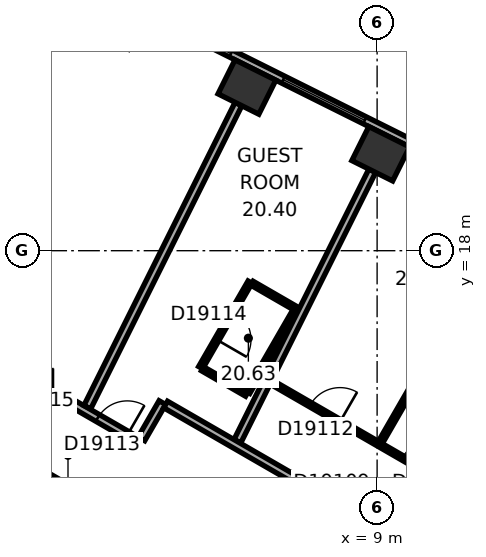
"""IFC4 building model, lengths in metres.
Left out: names, types, materials, properties, quantities, classifications, styles, units other than length and angle.
Written with IfcOpenShell. Run it as: python <this file> out.ifc"""

import sys

from ifc_helpers import new_model, si_unit, direction, frame, frame_2d, origin, origin_2d, place, context, subcontext, project, spatial, rectangle, extrude, element, fill, save


model = new_model("IFC4")
c1 = context("Model", 3, precision=1e-05, world=origin(), true_north=direction((0.0, 1.0)))
c2 = subcontext(c1, "Body", "Model", "MODEL_VIEW")
j1 = project(units=[si_unit("LENGTHUNIT", "METRE"), si_unit("PLANEANGLEUNIT", "RADIAN")], contexts=[c1])
p1 = place(None, origin())
s1 = spatial("IfcSite", under=j1, at=p1, CompositionType="ELEMENT")
p2 = place(p1, origin())
s2 = spatial("IfcBuilding", under=s1, at=p2, CompositionType="ELEMENT")
p3 = place(p2, frame((0.0, 0.0, 90.2)))
s3 = spatial("IfcBuildingStorey", under=s2, at=p3, CompositionType="ELEMENT", Elevation=90.2)
for number, where, z_axis, x_axis in (
    (1, (9.095, 20.551, 0.0), (0.0, 0.0, 1.0), (-0.895, 0.446, 0.0)),
    (2, (5.574, 22.306, 0.0), (0.0, 0.0, 1.0), (-0.895, 0.446, 0.0)),
):
    element("IfcColumn", number, at=place(p3, frame(where, z_axis=z_axis, x_axis=x_axis)), inside=s3, PredefinedType="COLUMN", context=c2, shape_type="SweptSolid", body=[
        extrude(rectangle(XDim=1.2, YDim=1.0, at=origin_2d()), origin(), (0.0, 0.0, 1.0), 3.3),
    ])
p4 = place(p3, frame((10.4, 5.658, 0.0), z_axis=(0.0, 0.0, 1.0), x_axis=(-0.866021384402, 0.500006961711, 0.0)))
e3 = element("IfcWall", 3, at=p4, inside=s3, PredefinedType="SHEAR", context=c2, shape_type="SweptSolid", body=[
    extrude(rectangle(XDim=12.355, YDim=1.2, at=frame_2d((6.178, 0.0))), origin(), (0.0, 0.0, 1.0), 3.3),
])
p5 = place(p4, frame((2.728, 0.0, 0.0)))
e4 = element("IfcOpeningElement", 4, at=p5, cuts=e3, PredefinedType="OPENING", context=c2, shape_type="SweptSolid", body=[
    extrude(rectangle(XDim=1.1, YDim=2.1, at=frame_2d((0.55, 1.05))), frame((0.0, 0.61, 0.0), z_axis=(0.0, -1.0, 0.0), x_axis=(1.0, 0.0, 0.0)), (0.0, 0.0, 1.0), 1.22),
])
p6 = place(p4, frame((5.328, 0.0, 0.0)))
e5 = element("IfcOpeningElement", 5, at=p6, cuts=e3, PredefinedType="OPENING", context=c2, shape_type="SweptSolid", body=[
    extrude(rectangle(XDim=1.1, YDim=2.1, at=frame_2d((0.55, 1.05))), frame((0.0, 0.61, 0.0), z_axis=(0.0, -1.0, 0.0), x_axis=(1.0, 0.0, 0.0)), (0.0, 0.0, 1.0), 1.22),
])
p7 = place(p4, frame((7.928, 0.0, 0.0)))
e6 = element("IfcOpeningElement", 6, at=p7, cuts=e3, PredefinedType="OPENING", context=c2, shape_type="SweptSolid", body=[
    extrude(rectangle(XDim=1.1, YDim=2.1, at=frame_2d((0.55, 1.05))), frame((0.0, 0.61, 0.0), z_axis=(0.0, -1.0, 0.0), x_axis=(1.0, 0.0, 0.0)), (0.0, 0.0, 1.0), 1.22),
])
p8 = place(p3, frame((0.3, 11.836, 0.0), z_axis=(0.0, 0.0, 1.0), x_axis=(-0.866021384402, -0.500006961711, 0.0)))
e7 = element("IfcWall", 7, at=p8, inside=s3, PredefinedType="SHEAR", context=c2, shape_type="SweptSolid", body=[
    extrude(rectangle(XDim=12.355, YDim=1.2, at=frame_2d((6.178, 0.0))), origin(), (0.0, 0.0, 1.0), 3.3),
])
p9 = place(p8, frame((6.378, 0.0, 0.0)))
e8 = element("IfcOpeningElement", 8, at=p9, cuts=e7, PredefinedType="OPENING", context=c2, shape_type="SweptSolid", body=[
    extrude(rectangle(XDim=1.5, YDim=2.1, at=frame_2d((0.75, 1.05))), frame((0.0, 0.61, 0.0), z_axis=(0.0, -1.0, 0.0), x_axis=(1.0, 0.0, 0.0)), (0.0, 0.0, 1.0), 1.22),
])
p10 = place(p8, frame((1.828, 0.0, 0.0)))
e9 = element("IfcOpeningElement", 9, at=p10, cuts=e7, PredefinedType="OPENING", context=c2, shape_type="SweptSolid", body=[
    extrude(rectangle(XDim=1.1, YDim=2.1, at=frame_2d((0.55, 1.05))), frame((0.0, 0.61, 0.0), z_axis=(0.0, -1.0, 0.0), x_axis=(1.0, 0.0, 0.0)), (0.0, 0.0, 1.0), 1.22),
])
p11 = place(p3, frame((20.63, 15.47, 0.0), z_axis=(0.0, 0.0, 1.0), x_axis=(-0.894934518609, 0.446197498203, 0.0)))
e10 = element("IfcWall", 10, at=p11, inside=s3, PredefinedType="STANDARD", context=c2, shape_type="SweptSolid", body=[
    extrude(rectangle(XDim=21.246, YDim=0.2, at=frame_2d((10.623, 0.0))), origin(), (0.0, 0.0, 1.0), 3.3),
])
p12 = place(p11, frame((1.553, 0.0, 0.8)))
e11 = element("IfcOpeningElement", 11, at=p12, cuts=e10, PredefinedType="OPENING", context=c2, shape_type="SweptSolid", body=[
    extrude(rectangle(XDim=2.4, YDim=1.7, at=frame_2d((1.2, 0.85))), frame((0.0, 0.11, 0.0), z_axis=(0.0, -1.0, 0.0), x_axis=(1.0, 0.0, 0.0)), (0.0, 0.0, 1.0), 0.22),
])
p13 = place(p11, frame((5.488, 0.0, 0.8)))
e12 = element("IfcOpeningElement", 12, at=p13, cuts=e10, PredefinedType="OPENING", context=c2, shape_type="SweptSolid", body=[
    extrude(rectangle(XDim=2.4, YDim=1.7, at=frame_2d((1.2, 0.85))), frame((0.0, 0.11, 0.0), z_axis=(0.0, -1.0, 0.0), x_axis=(1.0, 0.0, 0.0)), (0.0, 0.0, 1.0), 0.22),
])
p14 = place(p11, frame((9.422, 0.0, 0.8)))
e13 = element("IfcOpeningElement", 13, at=p14, cuts=e10, PredefinedType="OPENING", context=c2, shape_type="SweptSolid", body=[
    extrude(rectangle(XDim=2.4, YDim=1.7, at=frame_2d((1.2, 0.85))), frame((0.0, 0.11, 0.0), z_axis=(0.0, -1.0, 0.0), x_axis=(1.0, 0.0, 0.0)), (0.0, 0.0, 1.0), 0.22),
])
p15 = place(p11, frame((13.357, 0.0, 0.8)))
e14 = element("IfcOpeningElement", 14, at=p15, cuts=e10, PredefinedType="OPENING", context=c2, shape_type="SweptSolid", body=[
    extrude(rectangle(XDim=2.4, YDim=1.7, at=frame_2d((1.2, 0.85))), frame((0.0, 0.11, 0.0), z_axis=(0.0, -1.0, 0.0), x_axis=(1.0, 0.0, 0.0)), (0.0, 0.0, 1.0), 0.22),
])
p16 = place(p11, frame((17.292, 0.0, 0.8)))
e15 = element("IfcOpeningElement", 15, at=p16, cuts=e10, PredefinedType="OPENING", context=c2, shape_type="SweptSolid", body=[
    extrude(rectangle(XDim=2.4, YDim=1.7, at=frame_2d((1.2, 0.85))), frame((0.0, 0.11, 0.0), z_axis=(0.0, -1.0, 0.0), x_axis=(1.0, 0.0, 0.0)), (0.0, 0.0, 1.0), 0.22),
])
p17 = place(p3, frame((0.95, 14.001, 0.0), z_axis=(0.0, 0.0, 1.0), x_axis=(-1.0, 0.0, 0.0)))
e16 = element("IfcWall", 16, at=p17, inside=s3, PredefinedType="PARTITIONING", context=c2, shape_type="SweptSolid", body=[
    extrude(rectangle(XDim=1.86, YDim=0.2, at=frame_2d((0.93, 0.0))), origin(), (0.0, 0.0, 1.0), 3.05),
])
p18 = place(p17, frame((0.48, 0.0, 0.0)))
e17 = element("IfcOpeningElement", 17, at=p18, cuts=e16, PredefinedType="OPENING", context=c2, shape_type="SweptSolid", body=[
    extrude(rectangle(XDim=0.9, YDim=2.1, at=frame_2d((0.45, 1.05))), frame((0.0, 0.11, 0.0), z_axis=(0.0, -1.0, 0.0), x_axis=(1.0, 0.0, 0.0)), (0.0, 0.0, 1.0), 0.22),
])
p19 = place(p3, frame((2.748, 12.962, 0.0), z_axis=(0.0, 0.0, 1.0), x_axis=(-0.866013897511, 0.50001992892, 0.0)))
e18 = element("IfcWall", 18, at=p19, inside=s3, PredefinedType="PARTITIONING", context=c2, shape_type="SweptSolid", body=[
    extrude(rectangle(XDim=2.037, YDim=0.2, at=frame_2d((1.018, 0.0))), origin(), (0.0, 0.0, 1.0), 3.05),
])
p20 = place(p19, frame((0.372, 0.0, 0.0)))
e19 = element("IfcOpeningElement", 19, at=p20, cuts=e18, PredefinedType="OPENING", context=c2, shape_type="SweptSolid", body=[
    extrude(rectangle(XDim=0.9, YDim=2.1, at=frame_2d((0.45, 1.05))), frame((0.0, 0.11, 0.0), z_axis=(0.0, -1.0, 0.0), x_axis=(1.0, 0.0, 0.0)), (0.0, 0.0, 1.0), 0.22),
])
p21 = place(p3, frame((3.349, 14.002, 0.0), z_axis=(0.0, 0.0, 1.0), x_axis=(-0.500074377092, -0.865982457891, 0.0)))
e20 = element("IfcWall", 20, at=p21, inside=s3, PredefinedType="PARTITIONING", context=c2, shape_type="SweptSolid", body=[
    extrude(rectangle(XDim=1.101, YDim=0.2, at=frame_2d((0.55, 0.0))), origin(), (0.0, 0.0, 1.0), 3.05),
])
p22 = place(p3, frame((4.356, 14.922, 0.0), z_axis=(0.0, 0.0, 1.0), x_axis=(0.499936506574, 0.866062058628, 0.0)))
e21 = element("IfcWall", 21, at=p22, inside=s3, PredefinedType="PARTITIONING", context=c2, shape_type="SweptSolid", body=[
    extrude(rectangle(XDim=2.6, YDim=0.12, at=frame_2d((1.3, 0.0))), origin(), (0.0, 0.0, 1.0), 3.05),
])
p23 = place(p22, frame((0.85, 0.0, 0.0)))
e22 = element("IfcOpeningElement", 22, at=p23, cuts=e21, PredefinedType="OPENING", context=c2, shape_type="SweptSolid", body=[
    extrude(rectangle(XDim=0.9, YDim=2.1, at=frame_2d((0.45, 1.05))), frame((0.0, 0.07, 0.0), z_axis=(0.0, -1.0, 0.0), x_axis=(1.0, 0.0, 0.0)), (0.0, 0.0, 1.0), 0.14),
])
p24 = place(p3, frame((5.351, 21.859, 0.0), z_axis=(0.0, 0.0, 1.0), x_axis=(-0.446205309328, -0.894930624086, 0.0)))
e23 = element("IfcWall", 23, at=p24, inside=s3, PredefinedType="PARTITIONING", context=c2, shape_type="SweptSolid", body=[
    extrude(rectangle(XDim=8.913, YDim=0.2, at=frame_2d((4.457, 0.0))), origin(), (0.0, 0.0, 1.0), 2.6),
])
p25 = place(p3, frame((5.569, 14.222, 0.0), z_axis=(0.0, 0.0, 1.0), x_axis=(-0.866036909293, 0.499980071345, 0.0)))
e24 = element("IfcWall", 24, at=p25, inside=s3, PredefinedType="PARTITIONING", context=c2, shape_type="SweptSolid", body=[
    extrude(rectangle(XDim=1.34, YDim=0.12, at=frame_2d((0.67, 0.0))), origin(), (0.0, 0.0, 1.0), 3.05),
])
p26 = place(p3, frame((5.708, 17.144, 0.0), z_axis=(0.0, 0.0, 1.0), x_axis=(0.866082447003, -0.499901185229, 0.0)))
e25 = element("IfcWall", 25, at=p26, inside=s3, PredefinedType="PARTITIONING", context=c2, shape_type="SweptSolid", body=[
    extrude(rectangle(XDim=1.34, YDim=0.12, at=frame_2d((0.67, 0.0))), origin(), (0.0, 0.0, 1.0), 3.05),
])
p27 = place(p3, frame((6.839, 16.422, 0.0), z_axis=(0.0, 0.0, 1.0), x_axis=(-0.50000366821, -0.866023285932, 0.0)))
e26 = element("IfcWall", 26, at=p27, inside=s3, PredefinedType="PARTITIONING", context=c2, shape_type="SweptSolid", body=[
    extrude(rectangle(XDim=2.48, YDim=0.12, at=frame_2d((1.24, 0.0))), origin(), (0.0, 0.0, 1.0), 3.05),
])
p28 = place(p3, frame((8.872, 20.104, 0.0), z_axis=(0.0, 0.0, 1.0), x_axis=(-0.446218378653, -0.894924107706, 0.0)))
e27 = element("IfcWall", 27, at=p28, inside=s3, PredefinedType="PARTITIONING", context=c2, shape_type="SweptSolid", body=[
    extrude(rectangle(XDim=7.95, YDim=0.2, at=frame_2d((3.975, 0.0))), origin(), (0.0, 0.0, 1.0), 3.05),
])
p29 = place(p3, frame((10.885, 9.652, 0.0), z_axis=(0.0, 0.0, 1.0), x_axis=(-0.866033868542, 0.499985338323, 0.0)))
e28 = element("IfcWall", 28, at=p29, inside=s3, PredefinedType="PARTITIONING", context=c2, shape_type="SweptSolid", body=[
    extrude(rectangle(XDim=8.602, YDim=0.2, at=frame_2d((4.301, 0.0))), origin(), (0.0, 0.0, 1.0), 3.05),
])
p30 = place(p29, frame((2.739, 0.0, 0.0)))
e29 = element("IfcOpeningElement", 29, at=p30, cuts=e28, PredefinedType="OPENING", context=c2, shape_type="SweptSolid", body=[
    extrude(rectangle(XDim=1.0, YDim=2.1, at=frame_2d((0.5, 1.05))), frame((0.0, 0.11, 0.0), z_axis=(0.0, -1.0, 0.0), x_axis=(1.0, 0.0, 0.0)), (0.0, 0.0, 1.0), 0.22),
])
p31 = place(p3, frame((12.243, 18.423, 0.0), z_axis=(0.0, 0.0, 1.0), x_axis=(-0.499993523031, -0.866029143232, 0.0)))
e30 = element("IfcWall", 30, at=p31, inside=s3, PredefinedType="PARTITIONING", context=c2, shape_type="SweptSolid", body=[
    extrude(rectangle(XDim=6.315, YDim=0.12, at=frame_2d((3.157, 0.0))), origin(), (0.0, 0.0, 1.0), 2.6),
])
p32 = place(p3, frame((12.866, 10.702, 0.0), z_axis=(0.0, 0.0, 1.0), x_axis=(-0.866023151433, 0.500003901167, 0.0)))
e31 = element("IfcWall", 31, at=p32, inside=s3, PredefinedType="PARTITIONING", context=c2, shape_type="SweptSolid", body=[
    extrude(rectangle(XDim=7.684, YDim=0.12, at=frame_2d((3.842, 0.0))), origin(), (0.0, 0.0, 1.0), 3.05),
])
p33 = place(p32, frame((0.55, 0.0, 0.0)))
e32 = element("IfcOpeningElement", 32, at=p33, cuts=e31, PredefinedType="OPENING", context=c2, shape_type="SweptSolid", body=[
    extrude(rectangle(XDim=1.0, YDim=2.1, at=frame_2d((0.5, 1.05))), frame((0.0, 0.07, 0.0), z_axis=(0.0, -1.0, 0.0), x_axis=(1.0, 0.0, 0.0)), (0.0, 0.0, 1.0), 0.14),
])
p34 = place(p32, frame((2.8, 0.0, 0.0)))
e33 = element("IfcOpeningElement", 33, at=p34, cuts=e31, PredefinedType="OPENING", context=c2, shape_type="SweptSolid", body=[
    extrude(rectangle(XDim=0.9, YDim=2.1, at=frame_2d((0.45, 1.05))), frame((0.0, 0.07, 0.0), z_axis=(0.0, -1.0, 0.0), x_axis=(1.0, 0.0, 0.0)), (0.0, 0.0, 1.0), 0.14),
])
p35 = place(p32, frame((5.592, 0.0, 0.0)))
e34 = element("IfcOpeningElement", 34, at=p35, cuts=e31, PredefinedType="OPENING", context=c2, shape_type="SweptSolid", body=[
    extrude(rectangle(XDim=0.9, YDim=2.1, at=frame_2d((0.45, 1.05))), frame((0.0, 0.07, 0.0), z_axis=(0.0, -1.0, 0.0), x_axis=(1.0, 0.0, 0.0)), (0.0, 0.0, 1.0), 0.14),
])
p36 = place(p15, origin())
e35 = element("IfcWindow", 35, at=p36, inside=s3, PartitioningType="SINGLE_PANEL", PredefinedType="WINDOW", context=c2, shape_type="SweptSolid", body=[
    extrude(rectangle(XDim=2.4, YDim=1.7, at=frame_2d((1.2, 0.85))), frame((0.0, 0.03, 0.0), z_axis=(0.0, -1.0, 0.0), x_axis=(1.0, 0.0, 0.0)), (0.0, 0.0, 1.0), 0.06),
])
fill(e14, e35)
p37 = place(p16, origin())
e36 = element("IfcWindow", 36, at=p37, inside=s3, PartitioningType="SINGLE_PANEL", PredefinedType="WINDOW", context=c2, shape_type="SweptSolid", body=[
    extrude(rectangle(XDim=2.4, YDim=1.7, at=frame_2d((1.2, 0.85))), frame((0.0, 0.03, 0.0), z_axis=(0.0, -1.0, 0.0), x_axis=(1.0, 0.0, 0.0)), (0.0, 0.0, 1.0), 0.06),
])
fill(e15, e36)
p38 = place(p34, origin())
e37 = element("IfcDoor", 37, at=p38, inside=s3, OperationType="SINGLE_SWING_LEFT", PredefinedType="DOOR", context=c2, shape_type="SweptSolid", body=[
    extrude(rectangle(XDim=0.9, YDim=2.1, at=frame_2d((0.45, 1.05))), frame((0.0, 0.025, 0.0), z_axis=(0.0, -1.0, 0.0), x_axis=(1.0, 0.0, 0.0)), (0.0, 0.0, 1.0), 0.05),
])
fill(e33, e37)
p39 = place(p35, origin())
e38 = element("IfcDoor", 38, at=p39, inside=s3, OperationType="SINGLE_SWING_LEFT", PredefinedType="DOOR", context=c2, shape_type="SweptSolid", body=[
    extrude(rectangle(XDim=0.9, YDim=2.1, at=frame_2d((0.45, 1.05))), frame((0.0, 0.025, 0.0), z_axis=(0.0, -1.0, 0.0), x_axis=(1.0, 0.0, 0.0)), (0.0, 0.0, 1.0), 0.05),
])
fill(e34, e38)
p40 = place(p20, origin())
e39 = element("IfcDoor", 39, at=p40, inside=s3, OperationType="SINGLE_SWING_LEFT", PredefinedType="DOOR", context=c2, shape_type="SweptSolid", body=[
    extrude(rectangle(XDim=0.9, YDim=2.1, at=frame_2d((0.45, 1.05))), frame((0.0, 0.025, 0.0), z_axis=(0.0, -1.0, 0.0), x_axis=(1.0, 0.0, 0.0)), (0.0, 0.0, 1.0), 0.05),
])
fill(e19, e39)
p41 = place(p23, origin())
e40 = element("IfcDoor", 40, at=p41, inside=s3, OperationType="SINGLE_SWING_LEFT", PredefinedType="DOOR", context=c2, shape_type="SweptSolid", body=[
    extrude(rectangle(XDim=0.9, YDim=2.1, at=frame_2d((0.45, 1.05))), frame((0.0, 0.025, 0.0), z_axis=(0.0, -1.0, 0.0), x_axis=(1.0, 0.0, 0.0)), (0.0, 0.0, 1.0), 0.05),
])
fill(e22, e40)
p42 = place(p18, origin())
e41 = element("IfcDoor", 41, at=p42, inside=s3, OperationType="SINGLE_SWING_LEFT", PredefinedType="DOOR", context=c2, shape_type="SweptSolid", body=[
    extrude(rectangle(XDim=0.9, YDim=2.1, at=frame_2d((0.45, 1.05))), frame((0.0, 0.025, 0.0), z_axis=(0.0, -1.0, 0.0), x_axis=(1.0, 0.0, 0.0)), (0.0, 0.0, 1.0), 0.05),
])
fill(e17, e41)
save(model, sys.argv[1])
